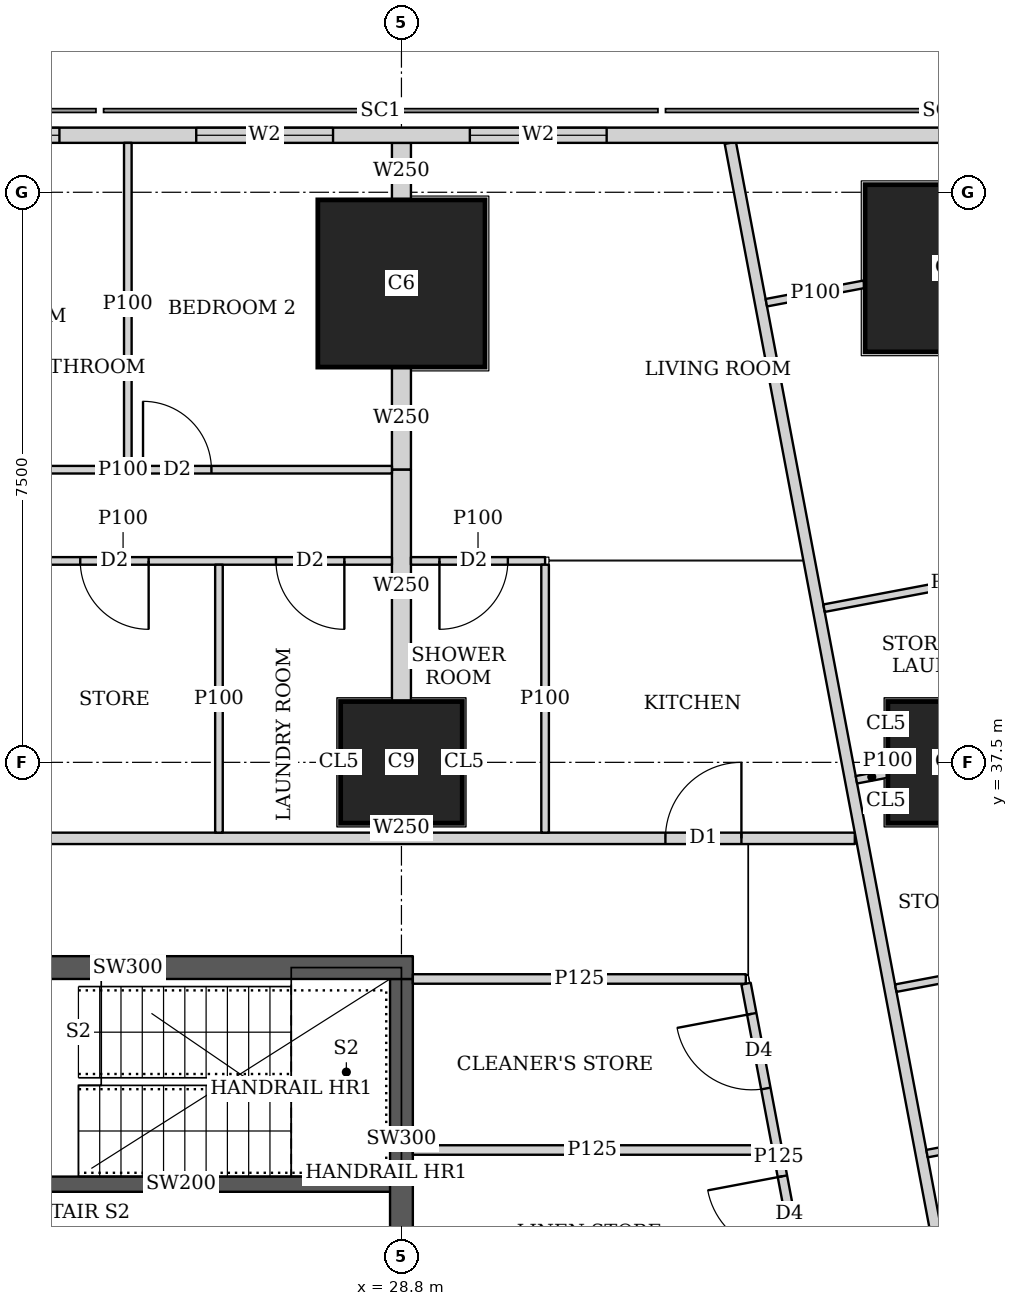
"""IFC4 building model, lengths in metres.
Left out: names, types, materials, properties, quantities, classifications, styles, units other than length and angle.
Written with IfcOpenShell. Run it as: python <this file> out.ifc"""

import sys

from ifc_helpers import new_model, si_unit, direction, frame, frame_2d, origin, origin_2d, place, context, subcontext, project, spatial, rectangle, extrude, element, fill, save


model = new_model("IFC4")
c1 = context("Model", 3, precision=1e-05, world=origin(), true_north=direction((0.0, 1.0)))
c2 = subcontext(c1, "Body", "Model", "MODEL_VIEW")
j1 = project(units=[si_unit("LENGTHUNIT", "METRE"), si_unit("PLANEANGLEUNIT", "RADIAN")], contexts=[c1])
p1 = place(None, origin())
s1 = spatial("IfcSite", under=j1, at=p1, CompositionType="ELEMENT")
p2 = place(p1, origin())
s2 = spatial("IfcBuilding", under=s1, at=p2, CompositionType="ELEMENT")
p3 = place(p2, frame((0.0, 0.0, 111.65)))
s3 = spatial("IfcBuildingStorey", under=s2, at=p3, CompositionType="ELEMENT", Elevation=111.65)
for number, where, z_axis, x_axis in (
    (1, (28.8, 37.5, 0.0), (0.0, 0.0, 1.0), (1.0, 0.0, 0.0)),
    (2, (36.0, 37.5, 0.0), (0.0, 0.0, 1.0), (1.0, 0.0, 0.0)),
):
    element("IfcColumn", number, at=place(p3, frame(where, z_axis=z_axis, x_axis=x_axis)), inside=s3, PredefinedType="COLUMN", context=c2, shape_type="SweptSolid", body=[
        extrude(rectangle(XDim=1.6, YDim=1.6, at=origin_2d()), origin(), (0.0, 0.0, 1.0), 3.75),
    ])
for number, where, z_axis, x_axis in (
    (3, (28.8, 43.8, 0.0), (0.0, 0.0, 1.0), (1.0, 0.0, 0.0)),
    (4, (36.0, 44.0, 0.0), (0.0, 0.0, 1.0), (1.0, 0.0, 0.0)),
):
    element("IfcColumn", number, at=place(p3, frame(where, z_axis=z_axis, x_axis=x_axis)), inside=s3, PredefinedType="COLUMN", context=c2, shape_type="SweptSolid", body=[
        extrude(rectangle(XDim=2.2, YDim=2.2, at=origin_2d()), origin(), (0.0, 0.0, 1.0), 3.75),
    ])
p4 = place(p3, frame((21.45, 34.8, 0.0), z_axis=(0.0, 0.0, 1.0), x_axis=(1.0, 0.0, 0.0)))
e5 = element("IfcWall", 5, at=p4, inside=s3, PredefinedType="SHEAR", context=c2, shape_type="SweptSolid", body=[
    extrude(rectangle(XDim=7.5, YDim=0.3, at=frame_2d((3.75, 0.0))), origin(), (0.0, 0.0, 1.0), 3.75),
])
p5 = place(p4, frame((0.5, 0.0, 0.0)))
e6 = element("IfcOpeningElement", 6, at=p5, cuts=e5, PredefinedType="OPENING", context=c2, shape_type="SweptSolid", body=[
    extrude(rectangle(XDim=1.1, YDim=2.1, at=frame_2d((0.55, 1.05))), frame((0.0, 0.16, 0.0), z_axis=(0.0, -1.0, 0.0), x_axis=(1.0, 0.0, 0.0)), (0.0, 0.0, 1.0), 0.32),
])
p6 = place(p3, frame((28.8, 30.45, 0.0), z_axis=(0.0, 0.0, 1.0), x_axis=(0.0, 1.0, 0.0)))
e7 = element("IfcWall", 7, at=p6, inside=s3, PredefinedType="SHEAR", context=c2, shape_type="SweptSolid", body=[
    extrude(rectangle(XDim=4.2, YDim=0.3, at=frame_2d((2.1, 0.0))), origin(), (0.0, 0.0, 1.0), 3.75),
])
p7 = place(p3, frame((40.106, 45.75, 0.0), z_axis=(0.0, 0.0, 1.0), x_axis=(-1.0, 0.0, 0.0)))
e8 = element("IfcWall", 8, at=p7, inside=s3, PredefinedType="SOLIDWALL", context=c2, shape_type="SweptSolid", body=[
    extrude(rectangle(XDim=37.943, YDim=0.2, at=frame_2d((18.971, 0.0))), origin(), (0.0, 0.0, 1.0), 3.5),
])
p8 = place(p7, frame((8.606, 0.0, 0.9)))
e9 = element("IfcOpeningElement", 9, at=p8, cuts=e8, PredefinedType="OPENING", context=c2, shape_type="SweptSolid", body=[
    extrude(rectangle(XDim=1.8, YDim=1.5, at=frame_2d((0.9, 0.75))), frame((0.0, 0.11, 0.0), z_axis=(0.0, -1.0, 0.0), x_axis=(1.0, 0.0, 0.0)), (0.0, 0.0, 1.0), 0.22),
])
p9 = place(p7, frame((12.206, 0.0, 0.9)))
e10 = element("IfcOpeningElement", 10, at=p9, cuts=e8, PredefinedType="OPENING", context=c2, shape_type="SweptSolid", body=[
    extrude(rectangle(XDim=1.8, YDim=1.5, at=frame_2d((0.9, 0.75))), frame((0.0, 0.11, 0.0), z_axis=(0.0, -1.0, 0.0), x_axis=(1.0, 0.0, 0.0)), (0.0, 0.0, 1.0), 0.22),
])
p10 = place(p7, frame((15.806, 0.0, 0.9)))
e11 = element("IfcOpeningElement", 11, at=p10, cuts=e8, PredefinedType="OPENING", context=c2, shape_type="SweptSolid", body=[
    extrude(rectangle(XDim=1.8, YDim=1.5, at=frame_2d((0.9, 0.75))), frame((0.0, 0.11, 0.0), z_axis=(0.0, -1.0, 0.0), x_axis=(1.0, 0.0, 0.0)), (0.0, 0.0, 1.0), 0.22),
])
p11 = place(p7, frame((19.406, 0.0, 0.9)))
e12 = element("IfcOpeningElement", 12, at=p11, cuts=e8, PredefinedType="OPENING", context=c2, shape_type="SweptSolid", body=[
    extrude(rectangle(XDim=1.8, YDim=1.5, at=frame_2d((0.9, 0.75))), frame((0.0, 0.11, 0.0), z_axis=(0.0, -1.0, 0.0), x_axis=(1.0, 0.0, 0.0)), (0.0, 0.0, 1.0), 0.22),
])
p12 = place(p7, frame((23.006, 0.0, 0.9)))
e13 = element("IfcOpeningElement", 13, at=p12, cuts=e8, PredefinedType="OPENING", context=c2, shape_type="SweptSolid", body=[
    extrude(rectangle(XDim=1.8, YDim=1.5, at=frame_2d((0.9, 0.75))), frame((0.0, 0.11, 0.0), z_axis=(0.0, -1.0, 0.0), x_axis=(1.0, 0.0, 0.0)), (0.0, 0.0, 1.0), 0.22),
])
p13 = place(p7, frame((26.606, 0.0, 0.9)))
e14 = element("IfcOpeningElement", 14, at=p13, cuts=e8, PredefinedType="OPENING", context=c2, shape_type="SweptSolid", body=[
    extrude(rectangle(XDim=1.8, YDim=1.5, at=frame_2d((0.9, 0.75))), frame((0.0, 0.11, 0.0), z_axis=(0.0, -1.0, 0.0), x_axis=(1.0, 0.0, 0.0)), (0.0, 0.0, 1.0), 0.22),
])
p14 = place(p3, frame((8.35, 36.5, 0.0), z_axis=(0.0, 0.0, 1.0), x_axis=(1.0, 0.0, 0.0)))
e15 = element("IfcWall", 15, at=p14, inside=s3, PredefinedType="SOLIDWALL", context=c2, shape_type="SweptSolid", body=[
    extrude(rectangle(XDim=26.415, YDim=0.15, at=frame_2d((13.208, 0.0))), origin(), (0.0, 0.0, 1.0), 3.5),
])
p15 = place(p14, frame((2.6, 0.0, 0.0)))
e16 = element("IfcOpeningElement", 16, at=p15, cuts=e15, PredefinedType="OPENING", context=c2, shape_type="SweptSolid", body=[
    extrude(rectangle(XDim=1.0, YDim=2.1, at=frame_2d((0.5, 1.05))), frame((0.0, 0.085, 0.0), z_axis=(0.0, -1.0, 0.0), x_axis=(1.0, 0.0, 0.0)), (0.0, 0.0, 1.0), 0.17),
])
p16 = place(p14, frame((10.949, 0.0, 0.0)))
e17 = element("IfcOpeningElement", 17, at=p16, cuts=e15, PredefinedType="OPENING", context=c2, shape_type="SweptSolid", body=[
    extrude(rectangle(XDim=1.0, YDim=2.1, at=frame_2d((0.5, 1.05))), frame((0.0, 0.085, 0.0), z_axis=(0.0, -1.0, 0.0), x_axis=(1.0, 0.0, 0.0)), (0.0, 0.0, 1.0), 0.17),
])
p17 = place(p14, frame((23.923, 0.0, 0.0)))
e18 = element("IfcOpeningElement", 18, at=p17, cuts=e15, PredefinedType="OPENING", context=c2, shape_type="SweptSolid", body=[
    extrude(rectangle(XDim=1.0, YDim=2.1, at=frame_2d((0.5, 1.05))), frame((0.0, 0.085, 0.0), z_axis=(0.0, -1.0, 0.0), x_axis=(1.0, 0.0, 0.0)), (0.0, 0.0, 1.0), 0.17),
])
p18 = place(p3, frame((33.127, 45.65, 0.0), z_axis=(0.0, 0.0, 1.0), x_axis=(0.185598547723, -0.98262565562, 0.0)))
e19 = element("IfcWall", 19, at=p18, inside=s3, PredefinedType="SOLIDWALL", context=c2, shape_type="SweptSolid", body=[
    extrude(rectangle(XDim=47.118, YDim=0.15, at=frame_2d((23.559, 0.0))), origin(), (0.0, 0.0, 1.0), 2.2),
])
p19 = place(p18, frame((20.373, 0.0, 0.0)))
e20 = element("IfcOpeningElement", 20, at=p19, cuts=e19, PredefinedType="OPENING", context=c2, shape_type="SweptSolid", body=[
    extrude(rectangle(XDim=1.0, YDim=2.1, at=frame_2d((0.5, 1.05))), frame((0.0, 0.085, 0.0), z_axis=(0.0, -1.0, 0.0), x_axis=(1.0, 0.0, 0.0)), (0.0, 0.0, 1.0), 0.17),
])
p20 = place(p18, frame((24.188, 0.0, 0.0)))
e21 = element("IfcOpeningElement", 21, at=p20, cuts=e19, PredefinedType="OPENING", context=c2, shape_type="SweptSolid", body=[
    extrude(rectangle(XDim=1.0, YDim=2.1, at=frame_2d((0.5, 1.05))), frame((0.0, 0.085, 0.0), z_axis=(0.0, -1.0, 0.0), x_axis=(1.0, 0.0, 0.0)), (0.0, 0.0, 1.0), 0.17),
])
p21 = place(p18, frame((32.608, 0.0, 0.0)))
e22 = element("IfcOpeningElement", 22, at=p21, cuts=e19, PredefinedType="OPENING", context=c2, shape_type="SweptSolid", body=[
    extrude(rectangle(XDim=1.0, YDim=2.1, at=frame_2d((0.5, 1.05))), frame((0.0, 0.085, 0.0), z_axis=(0.0, -1.0, 0.0), x_axis=(1.0, 0.0, 0.0)), (0.0, 0.0, 1.0), 0.17),
])
p22 = place(p3, frame((34.89, 43.79, 0.0), z_axis=(0.0, 0.0, 1.0), x_axis=(-0.982696831521, -0.185221319826, 0.0)))
e23 = element("IfcWall", 23, at=p22, inside=s3, PredefinedType="PARTITIONING", context=c2, shape_type="SweptSolid", body=[
    extrude(rectangle(XDim=1.312, YDim=0.1, at=frame_2d((0.656, 0.0))), origin(), (0.0, 0.0, 1.0), 2.05),
])
p23 = place(p3, frame((37.824, 40.182, 0.0), z_axis=(0.0, 0.0, 1.0), x_axis=(-0.982648794755, -0.185475998897, 0.0)))
e24 = element("IfcWall", 24, at=p23, inside=s3, PredefinedType="PARTITIONING", context=c2, shape_type="SweptSolid", body=[
    extrude(rectangle(XDim=3.525, YDim=0.1, at=frame_2d((1.763, 0.0))), origin(), (0.0, 0.0, 1.0), 3.5),
])
p24 = place(p3, frame((35.19, 37.347, 0.0), z_axis=(0.0, 0.0, 1.0), x_axis=(-0.982798158448, -0.184682916784, 0.0)))
e25 = element("IfcWall", 25, at=p24, inside=s3, PredefinedType="PARTITIONING", context=c2, shape_type="SweptSolid", body=[
    extrude(rectangle(XDim=0.411, YDim=0.1, at=frame_2d((0.206, 0.0))), origin(), (0.0, 0.0, 1.0), 3.5),
])
p25 = place(p3, frame((38.768, 35.184, 0.0), z_axis=(0.0, 0.0, 1.0), x_axis=(-0.982588017646, -0.185797706064, 0.0)))
e26 = element("IfcWall", 26, at=p25, inside=s3, PredefinedType="PARTITIONING", context=c2, shape_type="SweptSolid", body=[
    extrude(rectangle(XDim=3.525, YDim=0.1, at=frame_2d((1.763, 0.0))), origin(), (0.0, 0.0, 1.0), 3.5),
])
p26 = place(p3, frame((39.179, 33.006, 0.0), z_axis=(0.0, 0.0, 1.0), x_axis=(-0.982636169624, -0.185542874149, 0.0)))
e27 = element("IfcWall", 27, at=p26, inside=s3, PredefinedType="PARTITIONING", context=c2, shape_type="SweptSolid", body=[
    extrude(rectangle(XDim=3.525, YDim=0.1, at=frame_2d((1.763, 0.0))), origin(), (0.0, 0.0, 1.0), 3.5),
])
p27 = place(p3, frame((21.6, 41.35, 0.0), z_axis=(0.0, 0.0, 1.0), x_axis=(1.0, 0.0, 0.0)))
e28 = element("IfcWall", 28, at=p27, inside=s3, PredefinedType="PARTITIONING", context=c2, shape_type="SweptSolid", body=[
    extrude(rectangle(XDim=7.075, YDim=0.1, at=frame_2d((3.538, 0.0))), origin(), (0.0, 0.0, 1.0), 3.5),
])
p28 = place(p27, frame((0.2, 0.0, 0.0)))
e29 = element("IfcOpeningElement", 29, at=p28, cuts=e28, PredefinedType="OPENING", context=c2, shape_type="SweptSolid", body=[
    extrude(rectangle(XDim=0.9, YDim=2.1, at=frame_2d((0.45, 1.05))), frame((0.0, 0.06, 0.0), z_axis=(0.0, -1.0, 0.0), x_axis=(1.0, 0.0, 0.0)), (0.0, 0.0, 1.0), 0.12),
])
p29 = place(p27, frame((3.8, 0.0, 0.0)))
e30 = element("IfcOpeningElement", 30, at=p29, cuts=e28, PredefinedType="OPENING", context=c2, shape_type="SweptSolid", body=[
    extrude(rectangle(XDim=0.9, YDim=2.1, at=frame_2d((0.45, 1.05))), frame((0.0, 0.06, 0.0), z_axis=(0.0, -1.0, 0.0), x_axis=(1.0, 0.0, 0.0)), (0.0, 0.0, 1.0), 0.12),
])
p30 = place(p3, frame((21.6, 40.15, 0.0), z_axis=(0.0, 0.0, 1.0), x_axis=(1.0, 0.0, 0.0)))
e31 = element("IfcWall", 31, at=p30, inside=s3, PredefinedType="PARTITIONING", context=c2, shape_type="SweptSolid", body=[
    extrude(rectangle(XDim=7.075, YDim=0.1, at=frame_2d((3.538, 0.0))), origin(), (0.0, 0.0, 1.0), 3.5),
])
p31 = place(p30, frame((0.575, 0.0, 0.0)))
e32 = element("IfcOpeningElement", 32, at=p31, cuts=e31, PredefinedType="OPENING", context=c2, shape_type="SweptSolid", body=[
    extrude(rectangle(XDim=0.9, YDim=2.1, at=frame_2d((0.45, 1.05))), frame((0.0, 0.06, 0.0), z_axis=(0.0, -1.0, 0.0), x_axis=(1.0, 0.0, 0.0)), (0.0, 0.0, 1.0), 0.12),
])
p32 = place(p30, frame((5.549, 0.0, 0.0)))
e33 = element("IfcOpeningElement", 33, at=p32, cuts=e31, PredefinedType="OPENING", context=c2, shape_type="SweptSolid", body=[
    extrude(rectangle(XDim=0.9, YDim=2.1, at=frame_2d((0.45, 1.05))), frame((0.0, 0.06, 0.0), z_axis=(0.0, -1.0, 0.0), x_axis=(1.0, 0.0, 0.0)), (0.0, 0.0, 1.0), 0.12),
])
p33 = place(p30, frame((2.974, 0.0, 0.0)))
e34 = element("IfcOpeningElement", 34, at=p33, cuts=e31, PredefinedType="OPENING", context=c2, shape_type="SweptSolid", body=[
    extrude(rectangle(XDim=0.9, YDim=2.1, at=frame_2d((0.45, 1.05))), frame((0.0, 0.06, 0.0), z_axis=(0.0, -1.0, 0.0), x_axis=(1.0, 0.0, 0.0)), (0.0, 0.0, 1.0), 0.12),
])
p34 = place(p3, frame((25.2, 41.4, 0.0), z_axis=(0.0, 0.0, 1.0), x_axis=(0.0, 1.0, 0.0)))
e35 = element("IfcWall", 35, at=p34, inside=s3, PredefinedType="PARTITIONING", context=c2, shape_type="SweptSolid", body=[
    extrude(rectangle(XDim=4.25, YDim=0.1, at=frame_2d((2.125, 0.0))), origin(), (0.0, 0.0, 1.0), 2.2),
])
p35 = place(p3, frame((26.399, 36.575, 0.0), z_axis=(0.0, 0.0, 1.0), x_axis=(0.0, 1.0, 0.0)))
e36 = element("IfcWall", 36, at=p35, inside=s3, PredefinedType="PARTITIONING", context=c2, shape_type="SweptSolid", body=[
    extrude(rectangle(XDim=3.525, YDim=0.1, at=frame_2d((1.763, 0.0))), origin(), (0.0, 0.0, 1.0), 3.5),
])
p36 = place(p3, frame((28.925, 40.15, 0.0), z_axis=(0.0, 0.0, 1.0), x_axis=(1.0, 0.0, 0.0)))
e37 = element("IfcWall", 37, at=p36, inside=s3, PredefinedType="PARTITIONING", context=c2, shape_type="SweptSolid", body=[
    extrude(rectangle(XDim=1.765, YDim=0.1, at=frame_2d((0.882, 0.0))), origin(), (0.0, 0.0, 1.0), 3.5),
])
p37 = place(p36, frame((0.375, 0.0, 0.0)))
e38 = element("IfcOpeningElement", 38, at=p37, cuts=e37, PredefinedType="OPENING", context=c2, shape_type="SweptSolid", body=[
    extrude(rectangle(XDim=0.9, YDim=2.1, at=frame_2d((0.45, 1.05))), frame((0.0, 0.06, 0.0), z_axis=(0.0, -1.0, 0.0), x_axis=(1.0, 0.0, 0.0)), (0.0, 0.0, 1.0), 0.12),
])
p38 = place(p3, frame((30.69, 36.575, 0.0), z_axis=(0.0, 0.0, 1.0), x_axis=(0.0, 1.0, 0.0)))
e39 = element("IfcWall", 39, at=p38, inside=s3, PredefinedType="PARTITIONING", context=c2, shape_type="SweptSolid", body=[
    extrude(rectangle(XDim=3.525, YDim=0.1, at=frame_2d((1.763, 0.0))), origin(), (0.0, 0.0, 1.0), 3.5),
])
p39 = place(p3, frame((28.8, 41.35, 0.0), z_axis=(0.0, 0.0, 1.0), x_axis=(0.0, 1.0, 0.0)))
e40 = element("IfcWall", 40, at=p39, inside=s3, PredefinedType="SOLIDWALL", context=c2, shape_type="SweptSolid", body=[
    extrude(rectangle(XDim=1.349, YDim=0.25, at=frame_2d((0.674, 0.0))), origin(), (0.0, 0.0, 1.0), 3.5),
])
p40 = place(p3, frame((28.8, 44.901, 0.0), z_axis=(0.0, 0.0, 1.0), x_axis=(0.0, 1.0, 0.0)))
e41 = element("IfcWall", 41, at=p40, inside=s3, PredefinedType="SOLIDWALL", context=c2, shape_type="SweptSolid", body=[
    extrude(rectangle(XDim=0.749, YDim=0.25, at=frame_2d((0.375, 0.0))), origin(), (0.0, 0.0, 1.0), 3.5),
])
p41 = place(p3, frame((28.8, 36.575, 0.0), z_axis=(0.0, 0.0, 1.0), x_axis=(0.0, 1.0, 0.0)))
e42 = element("IfcWall", 42, at=p41, inside=s3, PredefinedType="SOLIDWALL", context=c2, shape_type="SweptSolid", body=[
    extrude(rectangle(XDim=0.124, YDim=0.25, at=frame_2d((0.062, 0.0))), origin(), (0.0, 0.0, 1.0), 3.5),
])
p42 = place(p3, frame((28.8, 38.301, 0.0), z_axis=(0.0, 0.0, 1.0), x_axis=(0.0, 1.0, 0.0)))
e43 = element("IfcWall", 43, at=p42, inside=s3, PredefinedType="SOLIDWALL", context=c2, shape_type="SweptSolid", body=[
    extrude(rectangle(XDim=3.049, YDim=0.25, at=frame_2d((1.524, 0.0))), origin(), (0.0, 0.0, 1.0), 3.5),
])
p43 = place(p3, frame((28.95, 34.65, 0.0), z_axis=(0.0, 0.0, 1.0), x_axis=(1.0, 0.0, 0.0)))
e44 = element("IfcWall", 44, at=p43, inside=s3, PredefinedType="PARTITIONING", context=c2, shape_type="SweptSolid", body=[
    extrude(rectangle(XDim=4.381, YDim=0.125, at=frame_2d((2.19, 0.0))), origin(), (0.0, 0.0, 1.0), 3.5),
])
p44 = place(p3, frame((34.193, 30.04, 0.0), z_axis=(0.0, 0.0, 1.0), x_axis=(-0.185626015863, 0.982620467034, 0.0)))
e45 = element("IfcWall", 45, at=p44, inside=s3, PredefinedType="PARTITIONING", context=c2, shape_type="SweptSolid", body=[
    extrude(rectangle(XDim=4.628, YDim=0.125, at=frame_2d((2.314, 0.0))), origin(), (0.0, 0.0, 1.0), 2.5),
])
p45 = place(p44, frame((1.05, 0.0, 0.0)))
e46 = element("IfcOpeningElement", 46, at=p45, cuts=e45, PredefinedType="OPENING", context=c2, shape_type="SweptSolid", body=[
    extrude(rectangle(XDim=1.0, YDim=2.1, at=frame_2d((0.5, 1.05))), frame((0.0, 0.073, 0.0), z_axis=(0.0, -1.0, 0.0), x_axis=(1.0, 0.0, 0.0)), (0.0, 0.0, 1.0), 0.145),
])
p46 = place(p44, frame((3.225, 0.0, 0.0)))
e47 = element("IfcOpeningElement", 47, at=p46, cuts=e45, PredefinedType="OPENING", context=c2, shape_type="SweptSolid", body=[
    extrude(rectangle(XDim=1.0, YDim=2.1, at=frame_2d((0.5, 1.05))), frame((0.0, 0.073, 0.0), z_axis=(0.0, -1.0, 0.0), x_axis=(1.0, 0.0, 0.0)), (0.0, 0.0, 1.0), 0.145),
])
p47 = place(p3, frame((28.95, 32.4, 0.0), z_axis=(0.0, 0.0, 1.0), x_axis=(1.0, 0.0, 0.0)))
e48 = element("IfcWall", 48, at=p47, inside=s3, PredefinedType="PARTITIONING", context=c2, shape_type="SweptSolid", body=[
    extrude(rectangle(XDim=4.722, YDim=0.125, at=frame_2d((2.361, 0.0))), origin(), (0.0, 0.0, 1.0), 3.5),
])
p48 = place(p3, frame((23.0, 31.95, 0.0), z_axis=(0.0, 0.0, 1.0), x_axis=(1.0, 0.0, 0.0)))
e49 = element("IfcWall", 49, at=p48, inside=s3, PredefinedType="SHEAR", context=c2, shape_type="SweptSolid", body=[
    extrude(rectangle(XDim=5.8, YDim=0.2, at=frame_2d((2.9, 0.0))), origin(), (0.0, 0.0, 1.0), 3.75),
])
p49 = place(p8, origin())
e50 = element("IfcWindow", 50, at=p49, inside=s3, PartitioningType="SINGLE_PANEL", PredefinedType="WINDOW", context=c2, shape_type="SweptSolid", body=[
    extrude(rectangle(XDim=1.8, YDim=1.5, at=frame_2d((0.9, 0.75))), frame((0.0, 0.03, 0.0), z_axis=(0.0, -1.0, 0.0), x_axis=(1.0, 0.0, 0.0)), (0.0, 0.0, 1.0), 0.06),
])
fill(e9, e50)
p50 = place(p9, origin())
e51 = element("IfcWindow", 51, at=p50, inside=s3, PartitioningType="SINGLE_PANEL", PredefinedType="WINDOW", context=c2, shape_type="SweptSolid", body=[
    extrude(rectangle(XDim=1.8, YDim=1.5, at=frame_2d((0.9, 0.75))), frame((0.0, 0.03, 0.0), z_axis=(0.0, -1.0, 0.0), x_axis=(1.0, 0.0, 0.0)), (0.0, 0.0, 1.0), 0.06),
])
fill(e10, e51)
p51 = place(p10, origin())
e52 = element("IfcWindow", 52, at=p51, inside=s3, PartitioningType="SINGLE_PANEL", PredefinedType="WINDOW", context=c2, shape_type="SweptSolid", body=[
    extrude(rectangle(XDim=1.8, YDim=1.5, at=frame_2d((0.9, 0.75))), frame((0.0, 0.03, 0.0), z_axis=(0.0, -1.0, 0.0), x_axis=(1.0, 0.0, 0.0)), (0.0, 0.0, 1.0), 0.06),
])
fill(e11, e52)
p52 = place(p29, origin())
e53 = element("IfcDoor", 53, at=p52, inside=s3, OperationType="SINGLE_SWING_LEFT", PredefinedType="DOOR", context=c2, shape_type="SweptSolid", body=[
    extrude(rectangle(XDim=0.9, YDim=2.1, at=frame_2d((0.45, 1.05))), frame((0.0, 0.025, 0.0), z_axis=(0.0, -1.0, 0.0), x_axis=(1.0, 0.0, 0.0)), (0.0, 0.0, 1.0), 0.05),
])
fill(e30, e53)
p53 = place(p32, origin())
e54 = element("IfcDoor", 54, at=p53, inside=s3, OperationType="SINGLE_SWING_LEFT", PredefinedType="DOOR", context=c2, shape_type="SweptSolid", body=[
    extrude(rectangle(XDim=0.9, YDim=2.1, at=frame_2d((0.45, 1.05))), frame((0.0, 0.025, 0.0), z_axis=(0.0, -1.0, 0.0), x_axis=(1.0, 0.0, 0.0)), (0.0, 0.0, 1.0), 0.05),
])
fill(e33, e54)
p54 = place(p33, origin())
e55 = element("IfcDoor", 55, at=p54, inside=s3, OperationType="SINGLE_SWING_LEFT", PredefinedType="DOOR", context=c2, shape_type="SweptSolid", body=[
    extrude(rectangle(XDim=0.9, YDim=2.1, at=frame_2d((0.45, 1.05))), frame((0.0, 0.025, 0.0), z_axis=(0.0, -1.0, 0.0), x_axis=(1.0, 0.0, 0.0)), (0.0, 0.0, 1.0), 0.05),
])
fill(e34, e55)
p55 = place(p37, origin())
e56 = element("IfcDoor", 56, at=p55, inside=s3, OperationType="SINGLE_SWING_RIGHT", PredefinedType="DOOR", context=c2, shape_type="SweptSolid", body=[
    extrude(rectangle(XDim=0.9, YDim=2.1, at=frame_2d((0.45, 1.05))), frame((0.0, 0.025, 0.0), z_axis=(0.0, -1.0, 0.0), x_axis=(1.0, 0.0, 0.0)), (0.0, 0.0, 1.0), 0.05),
])
fill(e38, e56)
p56 = place(p17, origin())
e57 = element("IfcDoor", 57, at=p56, inside=s3, OperationType="SINGLE_SWING_RIGHT", PredefinedType="DOOR", context=c2, shape_type="SweptSolid", body=[
    extrude(rectangle(XDim=1.0, YDim=2.1, at=frame_2d((0.5, 1.05))), frame((0.0, 0.025, 0.0), z_axis=(0.0, -1.0, 0.0), x_axis=(1.0, 0.0, 0.0)), (0.0, 0.0, 1.0), 0.05),
])
fill(e18, e57)
p57 = place(p45, origin())
e58 = element("IfcDoor", 58, at=p57, inside=s3, OperationType="SINGLE_SWING_RIGHT", PredefinedType="DOOR", context=c2, shape_type="SweptSolid", body=[
    extrude(rectangle(XDim=1.0, YDim=2.1, at=frame_2d((0.5, 1.05))), frame((0.0, 0.025, 0.0), z_axis=(0.0, -1.0, 0.0), x_axis=(1.0, 0.0, 0.0)), (0.0, 0.0, 1.0), 0.05),
])
fill(e46, e58)
p58 = place(p46, origin())
e59 = element("IfcDoor", 59, at=p58, inside=s3, OperationType="SINGLE_SWING_RIGHT", PredefinedType="DOOR", context=c2, shape_type="SweptSolid", body=[
    extrude(rectangle(XDim=1.0, YDim=2.1, at=frame_2d((0.5, 1.05))), frame((0.0, 0.025, 0.0), z_axis=(0.0, -1.0, 0.0), x_axis=(1.0, 0.0, 0.0)), (0.0, 0.0, 1.0), 0.05),
])
fill(e47, e59)
save(model, sys.argv[1])
